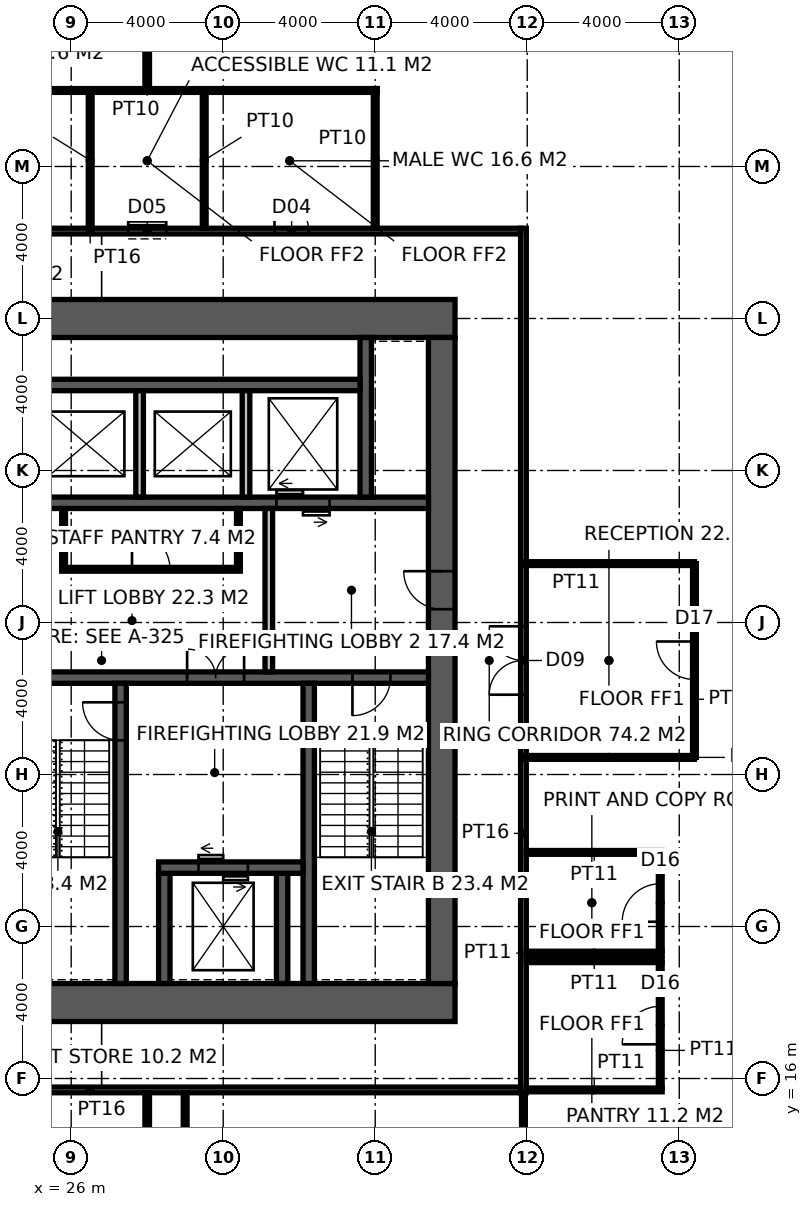
"""IFC4 building model, lengths in metres.
Left out: names, types, materials, properties, quantities, classifications, styles, units other than length and angle.
Written with IfcOpenShell. Run it as: python <this file> out.ifc"""

import sys

from ifc_helpers import new_model, si_unit, direction, frame, frame_2d, origin, place, context, subcontext, project, spatial, rectangle, extrude, element, fill, save


model = new_model("IFC4")
c1 = context("Model", 3, precision=1e-05, world=origin(), true_north=direction((0.0, 1.0)))
c2 = subcontext(c1, "Body", "Model", "MODEL_VIEW")
j1 = project(units=[si_unit("LENGTHUNIT", "METRE"), si_unit("PLANEANGLEUNIT", "RADIAN")], contexts=[c1])
p1 = place(None, origin())
s1 = spatial("IfcSite", under=j1, at=p1, CompositionType="ELEMENT")
p2 = place(p1, origin())
s2 = spatial("IfcBuilding", under=s1, at=p2, CompositionType="ELEMENT")
p3 = place(p2, frame((0.0, 0.0, 133.4)))
s3 = spatial("IfcBuildingStorey", under=s2, at=p3, CompositionType="ELEMENT", Elevation=133.4)
p4 = place(p3, frame((18.5, 18.0, -0.15), z_axis=(0.0, 0.0, 1.0), x_axis=(1.0, 0.0, 0.0)))
e1 = element("IfcWall", 1, at=p4, inside=s3, PredefinedType="SHEAR", context=c2, shape_type="SweptSolid", body=[
    extrude(rectangle(XDim=17.6, YDim=1.0, at=frame_2d((8.8, 0.0))), origin(), (0.0, 0.0, 1.0), 4.0),
])
p5 = place(p4, frame((3.45, 0.0, 0.15)))
e2 = element("IfcOpeningElement", 2, at=p5, cuts=e1, PredefinedType="OPENING", context=c2, shape_type="SweptSolid", body=[
    extrude(rectangle(XDim=1.5, YDim=2.4, at=frame_2d((0.75, 1.2))), frame((0.0, 0.51, 0.0), z_axis=(0.0, -1.0, 0.0), x_axis=(1.0, 0.0, 0.0)), (0.0, 0.0, 1.0), 1.02),
])
p6 = place(p3, frame((18.5, 36.0, -0.15), z_axis=(0.0, 0.0, 1.0), x_axis=(1.0, 0.0, 0.0)))
e3 = element("IfcWall", 3, at=p6, inside=s3, PredefinedType="SHEAR", context=c2, shape_type="SweptSolid", body=[
    extrude(rectangle(XDim=17.6, YDim=1.0, at=frame_2d((8.8, 0.0))), origin(), (0.0, 0.0, 1.0), 4.0),
])
p7 = place(p3, frame((35.75, 18.5, -0.15), z_axis=(0.0, 0.0, 1.0), x_axis=(0.0, 1.0, 0.0)))
e4 = element("IfcWall", 4, at=p7, inside=s3, PredefinedType="SHEAR", context=c2, shape_type="SweptSolid", body=[
    extrude(rectangle(XDim=17.0, YDim=0.7, at=frame_2d((8.5, 0.0))), origin(), (0.0, 0.0, 1.0), 4.0),
])
p8 = place(p7, frame((9.85, 0.0, 0.15)))
e5 = element("IfcOpeningElement", 5, at=p8, cuts=e4, PredefinedType="OPENING", context=c2, shape_type="SweptSolid", body=[
    extrude(rectangle(XDim=1.0, YDim=2.2, at=frame_2d((0.5, 1.1))), frame((0.0, 0.36, 0.0), z_axis=(0.0, -1.0, 0.0), x_axis=(1.0, 0.0, 0.0)), (0.0, 0.0, 1.0), 0.72),
])
p9 = place(p3, frame((24.15, 26.55, -0.15), z_axis=(0.0, 0.0, 1.0), x_axis=(1.0, 0.0, 0.0)))
e6 = element("IfcWall", 6, at=p9, inside=s3, PredefinedType="SHEAR", context=c2, shape_type="SweptSolid", body=[
    extrude(rectangle(XDim=11.25, YDim=0.3, at=frame_2d((5.625, 0.0))), origin(), (0.0, 0.0, 1.0), 4.0),
])
p10 = place(p9, frame((9.25, 0.0, 0.15)))
e7 = element("IfcOpeningElement", 7, at=p10, cuts=e6, PredefinedType="OPENING", context=c2, shape_type="SweptSolid", body=[
    extrude(rectangle(XDim=1.0, YDim=2.2, at=frame_2d((0.5, 1.1))), frame((0.0, 0.16, 0.0), z_axis=(0.0, -1.0, 0.0), x_axis=(1.0, 0.0, 0.0)), (0.0, 0.0, 1.0), 0.32),
])
p11 = place(p9, frame((4.9, 0.0, 0.15)))
e8 = element("IfcOpeningElement", 8, at=p11, cuts=e6, PredefinedType="OPENING", context=c2, shape_type="SweptSolid", body=[
    extrude(rectangle(XDim=1.5, YDim=2.4, at=frame_2d((0.75, 1.2))), frame((0.0, 0.16, 0.0), z_axis=(0.0, -1.0, 0.0), x_axis=(1.0, 0.0, 0.0)), (0.0, 0.0, 1.0), 0.32),
])
p12 = place(p3, frame((27.3, 18.5, -0.15), z_axis=(0.0, 0.0, 1.0), x_axis=(0.0, 1.0, 0.0)))
e9 = element("IfcWall", 9, at=p12, inside=s3, PredefinedType="SHEAR", context=c2, shape_type="SweptSolid", body=[
    extrude(rectangle(XDim=7.9, YDim=0.3, at=frame_2d((3.95, 0.0))), origin(), (0.0, 0.0, 1.0), 4.0),
])
p13 = place(p12, frame((6.4, 0.0, 0.15)))
e10 = element("IfcOpeningElement", 10, at=p13, cuts=e9, PredefinedType="OPENING", context=c2, shape_type="SweptSolid", body=[
    extrude(rectangle(XDim=1.0, YDim=2.2, at=frame_2d((0.5, 1.1))), frame((0.0, 0.16, 0.0), z_axis=(0.0, -1.0, 0.0), x_axis=(1.0, 0.0, 0.0)), (0.0, 0.0, 1.0), 0.32),
])
p14 = place(p3, frame((32.25, 18.5, -0.15), z_axis=(0.0, 0.0, 1.0), x_axis=(0.0, 1.0, 0.0)))
e11 = element("IfcWall", 11, at=p14, inside=s3, PredefinedType="SHEAR", context=c2, shape_type="SweptSolid", body=[
    extrude(rectangle(XDim=7.9, YDim=0.3, at=frame_2d((3.95, 0.0))), origin(), (0.0, 0.0, 1.0), 4.0),
])
for number, where, z_axis, x_axis in (
    (12, (28.45, 18.5, -0.15), (0.0, 0.0, 1.0), (0.0, 1.0, 0.0)),
    (13, (31.55, 18.5, -0.15), (0.0, 0.0, 1.0), (0.0, 1.0, 0.0)),
):
    element("IfcWall", number, at=place(p3, frame(where, z_axis=z_axis, x_axis=x_axis)), inside=s3, PredefinedType="SHEAR", context=c2, shape_type="SweptSolid", body=[
        extrude(rectangle(XDim=2.9, YDim=0.3, at=frame_2d((1.45, 0.0))), origin(), (0.0, 0.0, 1.0), 4.0),
    ])
p15 = place(p3, frame((28.3, 21.55, -0.15), z_axis=(0.0, 0.0, 1.0), x_axis=(1.0, 0.0, 0.0)))
e14 = element("IfcWall", 14, at=p15, inside=s3, PredefinedType="SHEAR", context=c2, shape_type="SweptSolid", body=[
    extrude(rectangle(XDim=3.8, YDim=0.3, at=frame_2d((1.9, 0.0))), origin(), (0.0, 0.0, 1.0), 4.0),
])
p16 = place(p15, frame((1.05, 0.0, 0.15)))
e15 = element("IfcOpeningElement", 15, at=p16, cuts=e14, PredefinedType="OPENING", context=c2, shape_type="SweptSolid", body=[
    extrude(rectangle(XDim=1.3, YDim=2.4, at=frame_2d((0.65, 1.2))), frame((0.0, 0.16, 0.0), z_axis=(0.0, -1.0, 0.0), x_axis=(1.0, 0.0, 0.0)), (0.0, 0.0, 1.0), 0.32),
])
p17 = place(p3, frame((24.15, 31.15, -0.15), z_axis=(0.0, 0.0, 1.0), x_axis=(1.0, 0.0, 0.0)))
e16 = element("IfcWall", 16, at=p17, inside=s3, PredefinedType="SHEAR", context=c2, shape_type="SweptSolid", body=[
    extrude(rectangle(XDim=11.25, YDim=0.3, at=frame_2d((5.625, 0.0))), origin(), (0.0, 0.0, 1.0), 4.0),
])
p18 = place(p17, frame((7.25, 0.0, 0.15)))
e17 = element("IfcOpeningElement", 17, at=p18, cuts=e16, PredefinedType="OPENING", context=c2, shape_type="SweptSolid", body=[
    extrude(rectangle(XDim=1.4, YDim=2.4, at=frame_2d((0.7, 1.2))), frame((0.0, 0.16, 0.0), z_axis=(0.0, -1.0, 0.0), x_axis=(1.0, 0.0, 0.0)), (0.0, 0.0, 1.0), 0.32),
])
p19 = place(p3, frame((33.75, 31.3, -0.15), z_axis=(0.0, 0.0, 1.0), x_axis=(0.0, 1.0, 0.0)))
e18 = element("IfcWall", 18, at=p19, inside=s3, PredefinedType="SHEAR", context=c2, shape_type="SweptSolid", body=[
    extrude(rectangle(XDim=4.2, YDim=0.3, at=frame_2d((2.1, 0.0))), origin(), (0.0, 0.0, 1.0), 4.0),
])
p20 = place(p3, frame((25.0, 34.25, -0.15), z_axis=(0.0, 0.0, 1.0), x_axis=(1.0, 0.0, 0.0)))
e19 = element("IfcWall", 19, at=p20, inside=s3, PredefinedType="SHEAR", context=c2, shape_type="SweptSolid", body=[
    extrude(rectangle(XDim=8.6, YDim=0.3, at=frame_2d((4.3, 0.0))), origin(), (0.0, 0.0, 1.0), 4.0),
])
for number, where, z_axis, x_axis in (
    (20, (27.8, 31.3, -0.15), (0.0, 0.0, 1.0), (0.0, 1.0, 0.0)),
    (21, (30.6, 31.3, -0.15), (0.0, 0.0, 1.0), (0.0, 1.0, 0.0)),
):
    element("IfcWall", number, at=place(p3, frame(where, z_axis=z_axis, x_axis=x_axis)), inside=s3, PredefinedType="SOLIDWALL", context=c2, shape_type="SweptSolid", body=[
        extrude(rectangle(XDim=2.8, YDim=0.2, at=frame_2d((1.4, 0.0))), origin(), (0.0, 0.0, 1.0), 4.0),
    ])
p21 = place(p3, frame((31.2, 26.7, 0.0), z_axis=(0.0, 0.0, 1.0), x_axis=(0.0, 1.0, 0.0)))
e22 = element("IfcWall", 22, at=p21, inside=s3, PredefinedType="SOLIDWALL", context=c2, shape_type="SweptSolid", body=[
    extrude(rectangle(XDim=4.3, YDim=0.2, at=frame_2d((2.15, 0.0))), origin(), (0.0, 0.0, 1.0), 3.85),
])
p22 = place(p3, frame((25.75, 29.4, 0.0), z_axis=(0.0, 0.0, 1.0), x_axis=(1.0, 0.0, 0.0)))
e23 = element("IfcWall", 23, at=p22, inside=s3, PredefinedType="PARTITIONING", context=c2, shape_type="SweptSolid", body=[
    extrude(rectangle(XDim=4.7, YDim=0.1, at=frame_2d((2.35, 0.0))), origin(), (0.0, 0.0, 1.0), 3.85),
])
p23 = place(p22, frame((1.85, 0.0, 0.0)))
e24 = element("IfcOpeningElement", 24, at=p23, cuts=e23, PredefinedType="OPENING", context=c2, shape_type="SweptSolid", body=[
    extrude(rectangle(XDim=1.0, YDim=2.2, at=frame_2d((0.5, 1.1))), frame((0.0, 0.06, 0.0), z_axis=(0.0, -1.0, 0.0), x_axis=(1.0, 0.0, 0.0)), (0.0, 0.0, 1.0), 0.12),
])
for number, where, z_axis, x_axis in (
    (25, (25.8, 29.45, 0.0), (0.0, 0.0, 1.0), (0.0, 1.0, 0.0)),
    (26, (30.4, 29.45, 0.0), (0.0, 0.0, 1.0), (0.0, 1.0, 0.0)),
):
    element("IfcWall", number, at=place(p3, frame(where, z_axis=z_axis, x_axis=x_axis)), inside=s3, PredefinedType="PARTITIONING", context=c2, shape_type="SweptSolid", body=[
        extrude(rectangle(XDim=1.55, YDim=0.1, at=frame_2d((0.775, 0.0))), origin(), (0.0, 0.0, 1.0), 3.85),
    ])
p24 = place(p3, frame((37.9, 15.625, 0.0), z_axis=(0.0, 0.0, 1.0), x_axis=(0.0, 1.0, 0.0)))
e27 = element("IfcWall", 27, at=p24, inside=s3, PredefinedType="PARTITIONING", context=c2, shape_type="SweptSolid", body=[
    extrude(rectangle(XDim=22.75, YDim=0.15, at=frame_2d((11.375, 0.0))), origin(), (0.0, 0.0, 1.0), 2.95),
])
p25 = place(p24, frame((10.475, 0.0, 0.0)))
e28 = element("IfcOpeningElement", 28, at=p25, cuts=e27, PredefinedType="OPENING", context=c2, shape_type="SweptSolid", body=[
    extrude(rectangle(XDim=1.8, YDim=2.4, at=frame_2d((0.9, 1.2))), frame((0.0, 0.085, 0.0), z_axis=(0.0, -1.0, 0.0), x_axis=(1.0, 0.0, 0.0)), (0.0, 0.0, 1.0), 0.17),
])
p26 = place(p3, frame((15.175, 15.7, 0.0), z_axis=(0.0, 0.0, 1.0), x_axis=(1.0, 0.0, 0.0)))
e29 = element("IfcWall", 29, at=p26, inside=s3, PredefinedType="PARTITIONING", context=c2, shape_type="SweptSolid", body=[
    extrude(rectangle(XDim=22.65, YDim=0.15, at=frame_2d((11.325, 0.0))), origin(), (0.0, 0.0, 1.0), 3.85),
])
p27 = place(p3, frame((15.175, 38.3, 0.0), z_axis=(0.0, 0.0, 1.0), x_axis=(1.0, 0.0, 0.0)))
e30 = element("IfcWall", 30, at=p27, inside=s3, PredefinedType="PARTITIONING", context=c2, shape_type="SweptSolid", body=[
    extrude(rectangle(XDim=22.65, YDim=0.15, at=frame_2d((11.325, 0.0))), origin(), (0.0, 0.0, 1.0), 3.85),
])
p28 = place(p27, frame((8.575, 0.0, 0.0)))
e31 = element("IfcOpeningElement", 31, at=p28, cuts=e30, PredefinedType="OPENING", context=c2, shape_type="SweptSolid", body=[
    extrude(rectangle(XDim=0.9, YDim=2.1, at=frame_2d((0.45, 1.05))), frame((0.0, 0.085, 0.0), z_axis=(0.0, -1.0, 0.0), x_axis=(1.0, 0.0, 0.0)), (0.0, 0.0, 1.0), 0.17),
])
p29 = place(p27, frame((12.325, 0.0, 0.0)))
e32 = element("IfcOpeningElement", 32, at=p29, cuts=e30, PredefinedType="OPENING", context=c2, shape_type="SweptSolid", body=[
    extrude(rectangle(XDim=1.0, YDim=2.1, at=frame_2d((0.5, 1.05))), frame((0.0, 0.085, 0.0), z_axis=(0.0, -1.0, 0.0), x_axis=(1.0, 0.0, 0.0)), (0.0, 0.0, 1.0), 0.17),
])
p30 = place(p27, frame((16.175, 0.0, 0.0)))
e33 = element("IfcOpeningElement", 33, at=p30, cuts=e30, PredefinedType="OPENING", context=c2, shape_type="SweptSolid", body=[
    extrude(rectangle(XDim=0.9, YDim=2.1, at=frame_2d((0.45, 1.05))), frame((0.0, 0.085, 0.0), z_axis=(0.0, -1.0, 0.0), x_axis=(1.0, 0.0, 0.0)), (0.0, 0.0, 1.0), 0.17),
])
p31 = place(p3, frame((34.0, 38.375, 0.0), z_axis=(0.0, 0.0, 1.0), x_axis=(0.0, 1.0, 0.0)))
e34 = element("IfcWall", 34, at=p31, inside=s3, PredefinedType="PARTITIONING", context=c2, shape_type="SweptSolid", body=[
    extrude(rectangle(XDim=3.675, YDim=0.1, at=frame_2d((1.837, 0.0))), origin(), (0.0, 0.0, 1.0), 2.85),
])
p32 = place(p3, frame((21.95, 42.0, 0.0), z_axis=(0.0, 0.0, 1.0), x_axis=(1.0, 0.0, 0.0)))
e35 = element("IfcWall", 35, at=p32, inside=s3, PredefinedType="PARTITIONING", context=c2, shape_type="SweptSolid", body=[
    extrude(rectangle(XDim=12.1, YDim=0.1, at=frame_2d((6.05, 0.0))), origin(), (0.0, 0.0, 1.0), 3.85),
])
for number, where, z_axis, x_axis in (
    (36, (26.5, 38.375, 0.0), (0.0, 0.0, 1.0), (0.0, 1.0, 0.0)),
    (37, (29.5, 38.375, 0.0), (0.0, 0.0, 1.0), (0.0, 1.0, 0.0)),
):
    element("IfcWall", number, at=place(p3, frame(where, z_axis=z_axis, x_axis=x_axis)), inside=s3, PredefinedType="PARTITIONING", context=c2, shape_type="SweptSolid", body=[
        extrude(rectangle(XDim=3.575, YDim=0.1, at=frame_2d((1.788, 0.0))), origin(), (0.0, 0.0, 1.0), 2.65),
    ])
p33 = place(p3, frame((28.0, 4.3, 0.0), z_axis=(0.0, 0.0, 1.0), x_axis=(0.0, 1.0, 0.0)))
e38 = element("IfcWall", 38, at=p33, inside=s3, PredefinedType="PARTITIONING", context=c2, shape_type="SweptSolid", body=[
    extrude(rectangle(XDim=11.325, YDim=0.12, at=frame_2d((5.663, 0.0))), origin(), (0.0, 0.0, 1.0), 3.85),
])
p34 = place(p3, frame((28.0, 42.05, 0.0), z_axis=(0.0, 0.0, 1.0), x_axis=(0.0, 1.0, 0.0)))
e39 = element("IfcWall", 39, at=p34, inside=s3, PredefinedType="PARTITIONING", context=c2, shape_type="SweptSolid", body=[
    extrude(rectangle(XDim=9.65, YDim=0.12, at=frame_2d((4.825, 0.0))), origin(), (0.0, 0.0, 1.0), 3.85),
])
for number, where, z_axis, x_axis in (
    (40, (37.975, 15.7, 0.0), (0.0, 0.0, 1.0), (1.0, 0.0, 0.0)),
    (41, (37.975, 19.1, 0.0), (0.0, 0.0, 1.0), (1.0, 0.0, 0.0)),
    (42, (37.975, 19.3, 0.0), (0.0, 0.0, 1.0), (1.0, 0.0, 0.0)),
    (43, (37.975, 21.95, 0.0), (0.0, 0.0, 1.0), (1.0, 0.0, 0.0)),
):
    element("IfcWall", number, at=place(p3, frame(where, z_axis=z_axis, x_axis=x_axis)), inside=s3, PredefinedType="PARTITIONING", context=c2, shape_type="SweptSolid", body=[
        extrude(rectangle(XDim=3.575, YDim=0.1, at=frame_2d((1.788, 0.0))), origin(), (0.0, 0.0, 1.0), 3.85),
    ])
p35 = place(p3, frame((28.999, 10.35, 0.0), z_axis=(0.0, 0.0, 1.0), x_axis=(0.0, 1.0, 0.0)))
e44 = element("IfcWall", 44, at=p35, inside=s3, PredefinedType="PARTITIONING", context=c2, shape_type="SweptSolid", body=[
    extrude(rectangle(XDim=5.275, YDim=0.1, at=frame_2d((2.637, 0.0))), origin(), (0.0, 0.0, 1.0), 3.85),
])
p36 = place(p3, frame((37.9, 10.35, 0.0), z_axis=(0.0, 0.0, 1.0), x_axis=(0.0, 1.0, 0.0)))
e45 = element("IfcWall", 45, at=p36, inside=s3, PredefinedType="PARTITIONING", context=c2, shape_type="SweptSolid", body=[
    extrude(rectangle(XDim=5.275, YDim=0.1, at=frame_2d((2.637, 0.0))), origin(), (0.0, 0.0, 1.0), 2.95),
])
p37 = place(p3, frame((41.5, 15.75, 0.0), z_axis=(0.0, 0.0, 1.0), x_axis=(0.0, 1.0, 0.0)))
e46 = element("IfcWall", 46, at=p37, inside=s3, PredefinedType="PARTITIONING", context=c2, shape_type="SweptSolid", body=[
    extrude(rectangle(XDim=3.3, YDim=0.1, at=frame_2d((1.65, 0.0))), origin(), (0.0, 0.0, 1.0), 3.85),
])
p38 = place(p37, frame((1.15, 0.0, 0.0)))
e47 = element("IfcOpeningElement", 47, at=p38, cuts=e46, PredefinedType="OPENING", context=c2, shape_type="SweptSolid", body=[
    extrude(rectangle(XDim=1.0, YDim=2.2, at=frame_2d((0.5, 1.1))), frame((0.0, 0.06, 0.0), z_axis=(0.0, -1.0, 0.0), x_axis=(1.0, 0.0, 0.0)), (0.0, 0.0, 1.0), 0.12),
])
p39 = place(p3, frame((41.5, 19.35, 0.0), z_axis=(0.0, 0.0, 1.0), x_axis=(0.0, 1.0, 0.0)))
e48 = element("IfcWall", 48, at=p39, inside=s3, PredefinedType="PARTITIONING", context=c2, shape_type="SweptSolid", body=[
    extrude(rectangle(XDim=2.55, YDim=0.1, at=frame_2d((1.275, 0.0))), origin(), (0.0, 0.0, 1.0), 3.85),
])
p40 = place(p39, frame((0.775, 0.0, 0.0)))
e49 = element("IfcOpeningElement", 49, at=p40, cuts=e48, PredefinedType="OPENING", context=c2, shape_type="SweptSolid", body=[
    extrude(rectangle(XDim=1.0, YDim=2.2, at=frame_2d((0.5, 1.1))), frame((0.0, 0.06, 0.0), z_axis=(0.0, -1.0, 0.0), x_axis=(1.0, 0.0, 0.0)), (0.0, 0.0, 1.0), 0.12),
])
p41 = place(p3, frame((37.9, 24.45, 0.0), z_axis=(0.0, 0.0, 1.0), x_axis=(1.0, 0.0, 0.0)))
e50 = element("IfcWall", 50, at=p41, inside=s3, PredefinedType="PARTITIONING", context=c2, shape_type="SweptSolid", body=[
    extrude(rectangle(XDim=4.5, YDim=0.1, at=frame_2d((2.25, 0.0))), origin(), (0.0, 0.0, 1.0), 2.65),
])
p42 = place(p3, frame((42.4, 24.45, 0.0), z_axis=(0.0, 0.0, 1.0), x_axis=(0.0, 1.0, 0.0)))
e51 = element("IfcWall", 51, at=p42, inside=s3, PredefinedType="PARTITIONING", context=c2, shape_type="SweptSolid", body=[
    extrude(rectangle(XDim=5.1, YDim=0.1, at=frame_2d((2.55, 0.0))), origin(), (0.0, 0.0, 1.0), 3.85),
])
p43 = place(p42, frame((2.05, 0.0, 0.0)))
e52 = element("IfcOpeningElement", 52, at=p43, cuts=e51, PredefinedType="OPENING", context=c2, shape_type="SweptSolid", body=[
    extrude(rectangle(XDim=1.0, YDim=2.2, at=frame_2d((0.5, 1.1))), frame((0.0, 0.06, 0.0), z_axis=(0.0, -1.0, 0.0), x_axis=(1.0, 0.0, 0.0)), (0.0, 0.0, 1.0), 0.12),
])
p44 = place(p3, frame((42.4, 29.55, 0.0), z_axis=(0.0, 0.0, 1.0), x_axis=(-1.0, 0.0, 0.0)))
e53 = element("IfcWall", 53, at=p44, inside=s3, PredefinedType="PARTITIONING", context=c2, shape_type="SweptSolid", body=[
    extrude(rectangle(XDim=4.5, YDim=0.1, at=frame_2d((2.25, 0.0))), origin(), (0.0, 0.0, 1.0), 3.85),
])
p45 = place(p13, origin())
e54 = element("IfcDoor", 54, at=p45, inside=s3, OperationType="SINGLE_SWING_RIGHT", PredefinedType="DOOR", context=c2, shape_type="SweptSolid", body=[
    extrude(rectangle(XDim=1.0, YDim=2.2, at=frame_2d((0.5, 1.1))), frame((0.0, 0.025, 0.0), z_axis=(0.0, -1.0, 0.0), x_axis=(1.0, 0.0, 0.0)), (0.0, 0.0, 1.0), 0.05),
])
fill(e10, e54)
p46 = place(p10, frame((1.0, 0.0, 0.0), z_axis=(0.0, 0.0, 1.0), x_axis=(-1.0, 0.0, 0.0)))
e55 = element("IfcDoor", 55, at=p46, inside=s3, OperationType="SINGLE_SWING_RIGHT", PredefinedType="DOOR", context=c2, shape_type="SweptSolid", body=[
    extrude(rectangle(XDim=1.0, YDim=2.2, at=frame_2d((0.5, 1.1))), frame((0.0, 0.025, 0.0), z_axis=(0.0, -1.0, 0.0), x_axis=(1.0, 0.0, 0.0)), (0.0, 0.0, 1.0), 0.05),
])
fill(e7, e55)
p47 = place(p8, origin())
e56 = element("IfcDoor", 56, at=p47, inside=s3, OperationType="SINGLE_SWING_RIGHT", PredefinedType="DOOR", context=c2, shape_type="SweptSolid", body=[
    extrude(rectangle(XDim=1.0, YDim=2.2, at=frame_2d((0.5, 1.1))), frame((0.0, 0.025, 0.0), z_axis=(0.0, -1.0, 0.0), x_axis=(1.0, 0.0, 0.0)), (0.0, 0.0, 1.0), 0.05),
])
fill(e5, e56)
p48 = place(p11, origin())
e57 = element("IfcDoor", 57, at=p48, inside=s3, OperationType="DOUBLE_DOOR_DOUBLE_SWING", PredefinedType="DOOR", context=c2, shape_type="SweptSolid", body=[
    extrude(rectangle(XDim=1.5, YDim=2.4, at=frame_2d((0.75, 1.2))), frame((0.0, 0.025, 0.0), z_axis=(0.0, -1.0, 0.0), x_axis=(1.0, 0.0, 0.0)), (0.0, 0.0, 1.0), 0.05),
])
fill(e8, e57)
p49 = place(p23, origin())
e58 = element("IfcDoor", 58, at=p49, inside=s3, OperationType="SINGLE_SWING_LEFT", PredefinedType="DOOR", context=c2, shape_type="SweptSolid", body=[
    extrude(rectangle(XDim=1.0, YDim=2.2, at=frame_2d((0.5, 1.1))), frame((0.0, 0.025, 0.0), z_axis=(0.0, -1.0, 0.0), x_axis=(1.0, 0.0, 0.0)), (0.0, 0.0, 1.0), 0.05),
])
fill(e24, e58)
p50 = place(p29, origin())
e59 = element("IfcDoor", 59, at=p50, inside=s3, OperationType="SLIDING_TO_LEFT", PredefinedType="DOOR", context=c2, shape_type="SweptSolid", body=[
    extrude(rectangle(XDim=1.0, YDim=2.1, at=frame_2d((0.5, 1.05))), frame((0.0, 0.025, 0.0), z_axis=(0.0, -1.0, 0.0), x_axis=(1.0, 0.0, 0.0)), (0.0, 0.0, 1.0), 0.05),
])
fill(e32, e59)
p51 = place(p30, origin())
e60 = element("IfcDoor", 60, at=p51, inside=s3, OperationType="SINGLE_SWING_LEFT", PredefinedType="DOOR", context=c2, shape_type="SweptSolid", body=[
    extrude(rectangle(XDim=0.9, YDim=2.1, at=frame_2d((0.45, 1.05))), frame((0.0, 0.025, 0.0), z_axis=(0.0, -1.0, 0.0), x_axis=(1.0, 0.0, 0.0)), (0.0, 0.0, 1.0), 0.05),
])
fill(e33, e60)
p52 = place(p25, origin())
e61 = element("IfcDoor", 61, at=p52, inside=s3, OperationType="DOUBLE_DOOR_DOUBLE_SWING", PredefinedType="DOOR", context=c2, shape_type="SweptSolid", body=[
    extrude(rectangle(XDim=1.8, YDim=2.4, at=frame_2d((0.9, 1.2))), frame((0.0, 0.025, 0.0), z_axis=(0.0, -1.0, 0.0), x_axis=(1.0, 0.0, 0.0)), (0.0, 0.0, 1.0), 0.05),
])
fill(e28, e61)
p53 = place(p38, origin())
e62 = element("IfcDoor", 62, at=p53, inside=s3, OperationType="SINGLE_SWING_LEFT", PredefinedType="DOOR", context=c2, shape_type="SweptSolid", body=[
    extrude(rectangle(XDim=1.0, YDim=2.2, at=frame_2d((0.5, 1.1))), frame((0.0, 0.025, 0.0), z_axis=(0.0, -1.0, 0.0), x_axis=(1.0, 0.0, 0.0)), (0.0, 0.0, 1.0), 0.05),
])
fill(e47, e62)
p54 = place(p40, origin())
e63 = element("IfcDoor", 63, at=p54, inside=s3, OperationType="SINGLE_SWING_LEFT", PredefinedType="DOOR", context=c2, shape_type="SweptSolid", body=[
    extrude(rectangle(XDim=1.0, YDim=2.2, at=frame_2d((0.5, 1.1))), frame((0.0, 0.025, 0.0), z_axis=(0.0, -1.0, 0.0), x_axis=(1.0, 0.0, 0.0)), (0.0, 0.0, 1.0), 0.05),
])
fill(e49, e63)
p55 = place(p43, origin())
e64 = element("IfcDoor", 64, at=p55, inside=s3, OperationType="SINGLE_SWING_RIGHT", PredefinedType="DOOR", context=c2, shape_type="SweptSolid", body=[
    extrude(rectangle(XDim=1.0, YDim=2.2, at=frame_2d((0.5, 1.1))), frame((0.0, 0.025, 0.0), z_axis=(0.0, -1.0, 0.0), x_axis=(1.0, 0.0, 0.0)), (0.0, 0.0, 1.0), 0.05),
])
fill(e52, e64)
p56 = place(p16, origin())
e65 = element("IfcDoor", 65, at=p56, inside=s3, OperationType="DOUBLE_DOOR_SLIDING", PredefinedType="DOOR", context=c2, shape_type="SweptSolid", body=[
    extrude(rectangle(XDim=1.3, YDim=2.4, at=frame_2d((0.65, 1.2))), frame((0.0, 0.025, 0.0), z_axis=(0.0, -1.0, 0.0), x_axis=(1.0, 0.0, 0.0)), (0.0, 0.0, 1.0), 0.05),
])
fill(e15, e65)
p57 = place(p18, origin())
e66 = element("IfcDoor", 66, at=p57, inside=s3, OperationType="DOUBLE_DOOR_SLIDING", PredefinedType="DOOR", context=c2, shape_type="SweptSolid", body=[
    extrude(rectangle(XDim=1.4, YDim=2.4, at=frame_2d((0.7, 1.2))), frame((0.0, 0.025, 0.0), z_axis=(0.0, -1.0, 0.0), x_axis=(1.0, 0.0, 0.0)), (0.0, 0.0, 1.0), 0.05),
])
fill(e17, e66)
save(model, sys.argv[1])
